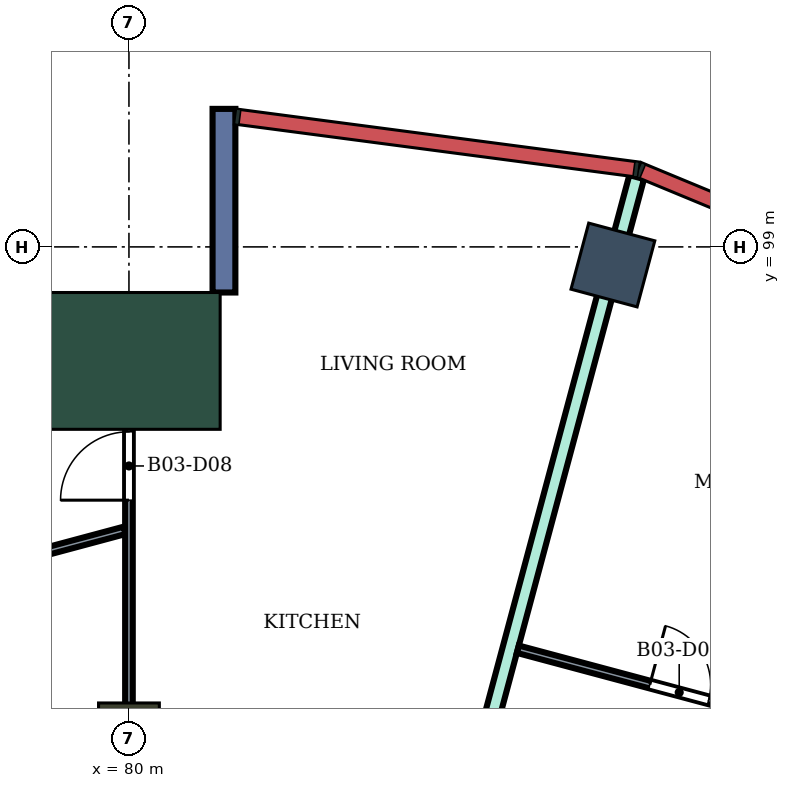
"""IFC4 building model, lengths in metres.
Left out: names, types, materials, properties, quantities, classifications, styles, units other than length and angle.
Written with IfcOpenShell. Run it as: python <this file> out.ifc"""

import sys

from ifc_helpers import new_model, si_unit, direction, frame, frame_2d, origin, origin_2d, place, context, subcontext, project, spatial, rectangle, extrude, element, fill, save


model = new_model("IFC4")
c1 = context("Model", 3, precision=1e-05, world=origin(), true_north=direction((0.0, 1.0)))
c2 = subcontext(c1, "Body", "Model", "MODEL_VIEW")
j1 = project(units=[si_unit("LENGTHUNIT", "METRE"), si_unit("PLANEANGLEUNIT", "RADIAN")], contexts=[c1])
p1 = place(None, origin())
s1 = spatial("IfcSite", under=j1, at=p1, CompositionType="ELEMENT")
p2 = place(p1, origin())
s2 = spatial("IfcBuilding", under=s1, at=p2, CompositionType="ELEMENT")
p3 = place(p2, frame((0.0, 0.0, 245.7)))
s3 = spatial("IfcBuildingStorey", under=s2, at=p3, CompositionType="ELEMENT", Elevation=245.7)
p4 = place(p3, frame((86.367, 98.762, 0.0), z_axis=(0.0, 0.0, 1.0), x_axis=(0.258819045103, 0.965925826289, 0.0)))
e1 = element("IfcColumn", 1, at=p4, inside=s3, PredefinedType="COLUMN", context=c2, shape_type="SweptSolid", body=[
    extrude(rectangle(XDim=0.9, YDim=0.9, at=origin_2d()), origin(), (0.0, 0.0, 1.0), 4.2),
])
p5 = place(p3, frame((80.0, 92.6, 0.0), z_axis=(0.0, 0.0, 1.0), x_axis=(0.0, 1.0, 0.0)))
e2 = element("IfcColumn", 2, at=p5, inside=s3, PredefinedType="COLUMN", context=c2, shape_type="SweptSolid", body=[
    extrude(rectangle(XDim=0.8, YDim=0.8, at=origin_2d()), origin(), (0.0, 0.0, 1.0), 4.2),
])
p6 = place(p3, frame((80.0, 97.5, 0.0), z_axis=(0.0, 0.0, 1.0), x_axis=(0.0, 1.0, 0.0)))
e3 = element("IfcColumn", 3, at=p6, inside=s3, PredefinedType="COLUMN", context=c2, shape_type="SweptSolid", body=[
    extrude(rectangle(XDim=1.8, YDim=2.4, at=origin_2d()), origin(), (0.0, 0.0, 1.0), 4.2),
])
p7 = place(p3, frame((81.25, 98.4, 0.0), z_axis=(0.0, 0.0, 1.0), x_axis=(0.0, 1.0, 0.0)))
e4 = element("IfcWall", 4, at=p7, inside=s3, PredefinedType="NOTDEFINED", context=c2, shape_type="SweptSolid", body=[
    extrude(rectangle(XDim=2.416, YDim=0.3, at=frame_2d((1.208, 0.0))), origin(), (0.0, 0.0, 1.0), 4.2),
])
p8 = place(p3, frame((83.335, 87.456, 0.0), z_axis=(0.0, 0.0, 1.0), x_axis=(0.259184958139, 0.965827705895, 0.0)))
e5 = element("IfcWall", 5, at=p8, inside=s3, PredefinedType="PARTITIONING", context=c2, shape_type="SweptSolid", body=[
    extrude(rectangle(XDim=12.904, YDim=0.2, at=frame_2d((6.452, 0.0))), origin(), (0.0, 0.0, 1.0), 3.75),
])
p9 = place(p3, frame((75.035, 93.955, 0.0), z_axis=(0.0, 0.0, 1.0), x_axis=(0.965868648254, 0.259032342228, 0.0)))
e6 = element("IfcWall", 6, at=p9, inside=s3, PredefinedType="PARTITIONING", context=c2, shape_type="SweptSolid", body=[
    extrude(rectangle(XDim=5.08, YDim=0.1, at=frame_2d((2.54, 0.0))), origin(), (0.0, 0.0, 1.0), 3.75),
])
p10 = place(p3, frame((80.0, 88.246, 0.0), z_axis=(0.0, 0.0, 1.0), x_axis=(0.0, 1.0, 0.0)))
e7 = element("IfcWall", 7, at=p10, inside=s3, PredefinedType="PARTITIONING", context=c2, shape_type="SweptSolid", body=[
    extrude(rectangle(XDim=9.954, YDim=0.1, at=frame_2d((4.977, 0.0))), origin(), (0.0, 0.0, 1.0), 3.75),
])
p11 = place(p10, frame((7.422, 0.0, 0.0)))
e8 = element("IfcOpeningElement", 8, at=p11, cuts=e7, PredefinedType="OPENING", context=c2, shape_type="SweptSolid", body=[
    extrude(rectangle(XDim=0.9, YDim=2.1, at=frame_2d((0.45, 1.05))), frame((0.0, 0.06, 0.0), z_axis=(0.0, -1.0, 0.0), x_axis=(1.0, 0.0, 0.0)), (0.0, 0.0, 1.0), 0.12),
])
p12 = place(p10, frame((3.12, 0.0, 0.0)))
e9 = element("IfcOpeningElement", 9, at=p12, cuts=e7, PredefinedType="OPENING", context=c2, shape_type="SweptSolid", body=[
    extrude(rectangle(XDim=0.8, YDim=2.1, at=frame_2d((0.4, 1.05))), frame((0.0, 0.06, 0.0), z_axis=(0.0, -1.0, 0.0), x_axis=(1.0, 0.0, 0.0)), (0.0, 0.0, 1.0), 0.12),
])
p13 = place(p3, frame((85.116, 93.707, 0.0), z_axis=(0.0, 0.0, 1.0), x_axis=(0.965979414561, -0.258618968068, 0.0)))
e10 = element("IfcWall", 10, at=p13, inside=s3, PredefinedType="PARTITIONING", context=c2, shape_type="SweptSolid", body=[
    extrude(rectangle(XDim=5.036, YDim=0.1, at=frame_2d((2.518, 0.0))), origin(), (0.0, 0.0, 1.0), 3.75),
])
p14 = place(p13, frame((1.798, 0.0, 0.0)))
e11 = element("IfcOpeningElement", 11, at=p14, cuts=e10, PredefinedType="OPENING", context=c2, shape_type="SweptSolid", body=[
    extrude(rectangle(XDim=0.8, YDim=2.1, at=frame_2d((0.4, 1.05))), frame((0.0, 0.06, 0.0), z_axis=(0.0, -1.0, 0.0), x_axis=(1.0, 0.0, 0.0)), (0.0, 0.0, 1.0), 0.12),
])
p15 = place(p3, frame((86.671, 86.554, 0.0), z_axis=(0.0, 0.0, 1.0), x_axis=(0.500104188531, 0.865965242151, 0.0)))
e12 = element("IfcWall", 12, at=p15, inside=s3, PredefinedType="PARTITIONING", context=c2, shape_type="SweptSolid", body=[
    extrude(rectangle(XDim=12.456, YDim=0.1, at=frame_2d((6.228, 0.0))), origin(), (0.0, 0.0, 1.0), 3.75),
])
p16 = place(p15, frame((9.111, 0.0, 0.0)))
e13 = element("IfcOpeningElement", 13, at=p16, cuts=e12, PredefinedType="OPENING", context=c2, shape_type="SweptSolid", body=[
    extrude(rectangle(XDim=0.9, YDim=2.1, at=frame_2d((0.45, 1.05))), frame((0.0, 0.06, 0.0), z_axis=(0.0, -1.0, 0.0), x_axis=(1.0, 0.0, 0.0)), (0.0, 0.0, 1.0), 0.12),
])
p17 = place(p14, origin())
e14 = element("IfcDoor", 14, at=p17, inside=s3, OperationType="SINGLE_SWING_LEFT", PredefinedType="DOOR", context=c2, shape_type="SweptSolid", body=[
    extrude(rectangle(XDim=0.8, YDim=2.1, at=frame_2d((0.4, 1.05))), frame((0.0, 0.025, 0.0), z_axis=(0.0, -1.0, 0.0), x_axis=(1.0, 0.0, 0.0)), (0.0, 0.0, 1.0), 0.05),
])
fill(e11, e14)
p18 = place(p11, origin())
e15 = element("IfcDoor", 15, at=p18, inside=s3, OperationType="SINGLE_SWING_LEFT", PredefinedType="DOOR", context=c2, shape_type="SweptSolid", body=[
    extrude(rectangle(XDim=0.9, YDim=2.1, at=frame_2d((0.45, 1.05))), frame((0.0, 0.025, 0.0), z_axis=(0.0, -1.0, 0.0), x_axis=(1.0, 0.0, 0.0)), (0.0, 0.0, 1.0), 0.05),
])
fill(e8, e15)
save(model, sys.argv[1])
